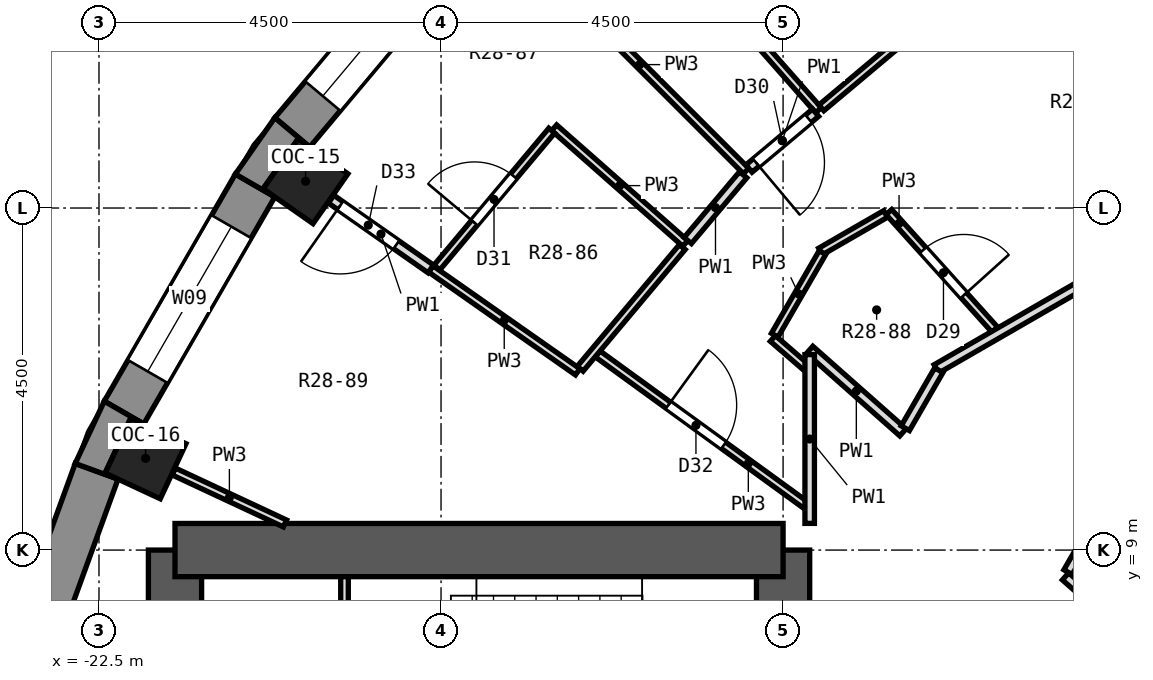
"""IFC4 building model, lengths in metres.
Left out: names, types, materials, properties, quantities, classifications, styles, units other than length and angle.
Written with IfcOpenShell. Run it as: python <this file> out.ifc"""

import sys

from ifc_helpers import new_model, si_unit, direction, frame, frame_2d, origin, origin_2d, place, context, subcontext, project, spatial, polyline, rectangle, outline, extrude, element, fill, save


model = new_model("IFC4")
c1 = context("Model", 3, precision=1e-05, world=origin(), true_north=direction((0.0, 1.0)))
c2 = subcontext(c1, "Body", "Model", "MODEL_VIEW")
j1 = project(units=[si_unit("LENGTHUNIT", "METRE"), si_unit("PLANEANGLEUNIT", "RADIAN")], contexts=[c1])
p1 = place(None, origin())
s1 = spatial("IfcSite", under=j1, at=p1, CompositionType="ELEMENT")
p2 = place(p1, origin())
s2 = spatial("IfcBuilding", under=s1, at=p2, CompositionType="ELEMENT")
p3 = place(p2, frame((0.0, 0.0, 190.5)))
s3 = spatial("IfcBuildingStorey", under=s2, at=p3, CompositionType="ELEMENT", Elevation=190.5)
for number, where, z_axis, x_axis in (
    (1, (-19.782, 13.852, 0.0), (0.0, 0.0, 1.0), (-0.819, 0.574, 0.0)),
    (2, (-21.887, 10.206, 0.0), (0.0, 0.0, 1.0), (-0.906, 0.423, 0.0)),
):
    element("IfcColumn", number, at=place(p3, frame(where, z_axis=z_axis, x_axis=x_axis)), inside=s3, PredefinedType="COLUMN", context=c2, shape_type="SweptSolid", body=[
        extrude(rectangle(XDim=0.8, YDim=0.8, at=origin_2d()), origin(), (0.0, 0.0, 1.0), 3.3),
    ])
p4 = place(p3, frame((-13.5, -9.0, 0.0), z_axis=(0.0, 0.0, 1.0), x_axis=(0.0, 1.0, 0.0)))
e3 = element("IfcWall", 3, at=p4, inside=s3, PredefinedType="SHEAR", context=c2, shape_type="SweptSolid", body=[
    extrude(rectangle(XDim=18.0, YDim=0.7, at=frame_2d((9.0, 0.0))), origin(), (0.0, 0.0, 1.0), 3.3),
])
p5 = place(p4, frame((15.4, 0.0, 0.0)))
e4 = element("IfcOpeningElement", 4, at=p5, cuts=e3, PredefinedType="OPENING", context=c2, shape_type="SweptSolid", body=[
    extrude(rectangle(XDim=1.2, YDim=2.1, at=frame_2d((0.6, 1.05))), frame((0.0, 0.362, 0.0), z_axis=(0.0, -1.0, 0.0), x_axis=(1.0, 0.0, 0.0)), (0.0, 0.0, 1.0), 0.724),
])
p6 = place(p4, frame((1.4, 0.0, 0.0)))
e5 = element("IfcOpeningElement", 5, at=p6, cuts=e3, PredefinedType="OPENING", context=c2, shape_type="SweptSolid", body=[
    extrude(rectangle(XDim=1.2, YDim=2.1, at=frame_2d((0.6, 1.05))), frame((0.0, 0.362, 0.0), z_axis=(0.0, -1.0, 0.0), x_axis=(1.0, 0.0, 0.0)), (0.0, 0.0, 1.0), 0.724),
])
p7 = place(p4, frame((7.5, 0.0, 0.0)))
e6 = element("IfcOpeningElement", 6, at=p7, cuts=e3, PredefinedType="OPENING", context=c2, shape_type="SweptSolid", body=[
    extrude(rectangle(XDim=3.0, YDim=2.4, at=frame_2d((1.5, 1.2))), frame((0.0, 0.362, 0.0), z_axis=(0.0, -1.0, 0.0), x_axis=(1.0, 0.0, 0.0)), (0.0, 0.0, 1.0), 0.724),
])
p8 = place(p3, frame((-21.5, -9.0, 0.0), z_axis=(0.0, 0.0, 1.0), x_axis=(0.0, 1.0, 0.0)))
e7 = element("IfcWall", 7, at=p8, inside=s3, PredefinedType="SHEAR", context=c2, shape_type="SweptSolid", body=[
    extrude(rectangle(XDim=18.0, YDim=0.7, at=frame_2d((9.0, 0.0))), origin(), (0.0, 0.0, 1.0), 3.3),
])
p9 = place(p8, frame((9.45, 0.0, 0.0)))
e8 = element("IfcOpeningElement", 8, at=p9, cuts=e7, PredefinedType="OPENING", context=c2, shape_type="SweptSolid", body=[
    extrude(rectangle(XDim=0.9, YDim=2.1, at=frame_2d((0.45, 1.05))), frame((0.0, 0.362, 0.0), z_axis=(0.0, -1.0, 0.0), x_axis=(1.0, 0.0, 0.0)), (0.0, 0.0, 1.0), 0.724),
])
p10 = place(p8, frame((7.65, 0.0, 0.0)))
e9 = element("IfcOpeningElement", 9, at=p10, cuts=e7, PredefinedType="OPENING", context=c2, shape_type="SweptSolid", body=[
    extrude(rectangle(XDim=0.9, YDim=2.1, at=frame_2d((0.45, 1.05))), frame((0.0, 0.362, 0.0), z_axis=(0.0, -1.0, 0.0), x_axis=(1.0, 0.0, 0.0)), (0.0, 0.0, 1.0), 0.724),
])
p11 = place(p3, frame((-13.5, 9.0, 0.0), z_axis=(0.0, 0.0, 1.0), x_axis=(-1.0, 0.0, 0.0)))
e10 = element("IfcWall", 10, at=p11, inside=s3, PredefinedType="SHEAR", context=c2, shape_type="SweptSolid", body=[
    extrude(rectangle(XDim=8.0, YDim=0.7, at=frame_2d((4.0, 0.0))), origin(), (0.0, 0.0, 1.0), 3.3),
])
p12 = place(p3, frame((-17.74, 17.137, 0.0), z_axis=(0.0, 0.0, 1.0), x_axis=(-0.642770398358, -0.766058884809, 0.0)))
e11 = element("IfcWall", 11, at=p12, inside=s3, PredefinedType="SOLIDWALL", context=c2, shape_type="SweptSolid", body=[
    extrude(rectangle(XDim=3.449, YDim=0.6, at=frame_2d((1.725, 0.0))), origin(), (0.0, 0.0, 1.0), 2.85),
])
p13 = place(p12, frame((0.625, 0.0, 0.9)))
e12 = element("IfcOpeningElement", 12, at=p13, cuts=e11, PredefinedType="OPENING", context=c2, shape_type="SweptSolid", body=[
    extrude(rectangle(XDim=2.2, YDim=1.8, at=frame_2d((1.1, 0.9))), frame((0.0, 0.312, 0.0), z_axis=(0.0, -1.0, 0.0), x_axis=(1.0, 0.0, 0.0)), (0.0, 0.0, 1.0), 0.624),
])
p14 = place(p3, frame((-20.446, 13.796, 0.0), z_axis=(0.0, 0.0, 1.0), x_axis=(-0.499998129301, -0.86602648383, 0.0)))
e13 = element("IfcWall", 13, at=p14, inside=s3, PredefinedType="SOLIDWALL", context=c2, shape_type="SweptSolid", body=[
    extrude(rectangle(XDim=3.45, YDim=0.6, at=frame_2d((1.725, 0.0))), origin(), (0.0, 0.0, 1.0), 2.85),
])
p15 = place(p14, frame((0.625, 0.0, 0.9)))
e14 = element("IfcOpeningElement", 14, at=p15, cuts=e13, PredefinedType="OPENING", context=c2, shape_type="SweptSolid", body=[
    extrude(rectangle(XDim=2.2, YDim=1.8, at=frame_2d((1.1, 0.9))), frame((0.0, 0.312, 0.0), z_axis=(0.0, -1.0, 0.0), x_axis=(1.0, 0.0, 0.0)), (0.0, 0.0, 1.0), 0.624),
])
p16 = place(p3, frame((-22.531, 10.036, 0.0), z_axis=(0.0, 0.0, 1.0), x_axis=(-0.342032843455, -0.93968799822, 0.0)))
e15 = element("IfcWall", 15, at=p16, inside=s3, PredefinedType="SOLIDWALL", context=c2, shape_type="SweptSolid", body=[
    extrude(rectangle(XDim=3.45, YDim=0.6, at=frame_2d((1.725, 0.0))), origin(), (0.0, 0.0, 1.0), 2.85),
])
p17 = place(p3, origin())
e16 = element("IfcWall", 16, at=p17, inside=s3, PredefinedType="SOLIDWALL", context=c2, shape_type="SweptSolid", body=[
    extrude(outline(polyline([(-20.187, 14.687), (-20.706, 13.946), (-20.186, 13.646), (-20.34, 13.754), (-19.881, 14.409), (-19.727, 14.302), (-20.187, 14.687)])), origin(), (0.0, 0.0, 1.0), 2.85),
])
p18 = place(p3, origin())
e17 = element("IfcWall", 17, at=p18, inside=s3, PredefinedType="SOLIDWALL", context=c2, shape_type="SweptSolid", body=[
    extrude(outline(polyline([(-22.813, 10.139), (-22.249, 9.934), (-22.419, 10.013), (-22.081, 10.738), (-21.911, 10.659), (-22.431, 10.959), (-22.813, 10.139)])), origin(), (0.0, 0.0, 1.0), 2.85),
])
p19 = place(p3, frame((-14.556, 16.512, 0.0), z_axis=(0.0, 0.0, 1.0), x_axis=(0.661368963491, -0.750060726962, 0.0)))
e18 = element("IfcWall", 18, at=p19, inside=s3, PredefinedType="PARTITIONING", context=c2, shape_type="SweptSolid", body=[
    extrude(rectangle(XDim=2.301, YDim=0.1, at=frame_2d((1.151, 0.0))), origin(), (0.0, 0.0, 1.0), 2.85),
])
p20 = place(p3, frame((-12.108, 13.447, 0.0), z_axis=(0.0, 0.0, 1.0), x_axis=(0.669048883613, -0.743218400833, 0.0)))
e19 = element("IfcWall", 19, at=p20, inside=s3, PredefinedType="PARTITIONING", context=c2, shape_type="SweptSolid", body=[
    extrude(rectangle(XDim=2.084, YDim=0.1, at=frame_2d((1.042, 0.0))), origin(), (0.0, 0.0, 1.0), 2.85),
])
p21 = place(p20, frame((0.673, 0.0, 0.0)))
e20 = element("IfcOpeningElement", 20, at=p21, cuts=e19, PredefinedType="OPENING", context=c2, shape_type="SweptSolid", body=[
    extrude(rectangle(XDim=0.8, YDim=2.1, at=frame_2d((0.4, 1.05))), frame((0.0, 0.062, 0.0), z_axis=(0.0, -1.0, 0.0), x_axis=(1.0, 0.0, 0.0)), (0.0, 0.0, 1.0), 0.124),
])
p22 = place(p3, frame((-16.787, 16.787, 0.0), z_axis=(0.0, 0.0, 1.0), x_axis=(0.707106781187, -0.707106781187, 0.0)))
e21 = element("IfcWall", 21, at=p22, inside=s3, PredefinedType="PARTITIONING", context=c2, shape_type="SweptSolid", body=[
    extrude(rectangle(XDim=3.959, YDim=0.1, at=frame_2d((1.979, 0.0))), origin(), (0.0, 0.0, 1.0), 2.85),
])
p23 = place(p3, frame((-13.15, 11.634, 0.0), z_axis=(0.0, 0.0, 1.0), x_axis=(0.748945343294, -0.662631777655, 0.0)))
e22 = element("IfcWall", 22, at=p23, inside=s3, PredefinedType="PARTITIONING", context=c2, shape_type="SweptSolid", body=[
    extrude(rectangle(XDim=1.638, YDim=0.125, at=frame_2d((0.819, 0.0))), origin(), (0.0, 0.0, 1.0), 2.85),
])
p24 = place(p3, frame((-9.784, 8.654, 0.0), z_axis=(0.0, 0.0, 1.0), x_axis=(0.74898514635, -0.662586787181, 0.0)))
e23 = element("IfcWall", 23, at=p24, inside=s3, PredefinedType="PARTITIONING", context=c2, shape_type="SweptSolid", body=[
    extrude(rectangle(XDim=4.49, YDim=0.125, at=frame_2d((2.245, 0.0))), origin(), (0.0, 0.0, 1.0), 2.85),
])
p25 = place(p3, frame((-16.512, 14.556, 0.0), z_axis=(0.0, 0.0, 1.0), x_axis=(0.750060726962, -0.661368963491, 0.0)))
e24 = element("IfcWall", 24, at=p25, inside=s3, PredefinedType="PARTITIONING", context=c2, shape_type="SweptSolid", body=[
    extrude(rectangle(XDim=2.301, YDim=0.1, at=frame_2d((1.151, 0.0))), origin(), (0.0, 0.0, 1.0), 2.85),
])
p26 = place(p3, frame((-13.635, 11.784, 0.0), z_axis=(0.0, 0.0, 1.0), x_axis=(0.75671861177, -0.653740730413, 0.0)))
e25 = element("IfcWall", 25, at=p26, inside=s3, PredefinedType="PARTITIONING", context=c2, shape_type="SweptSolid", body=[
    extrude(rectangle(XDim=0.578, YDim=0.1, at=frame_2d((0.289, 0.0))), origin(), (0.0, 0.0, 1.0), 2.85),
])
p27 = place(p3, frame((-15.939, 11.581, 0.0), z_axis=(0.0, 0.0, 1.0), x_axis=(0.809057281934, -0.587729797228, 0.0)))
e26 = element("IfcWall", 26, at=p27, inside=s3, PredefinedType="PARTITIONING", context=c2, shape_type="SweptSolid", body=[
    extrude(rectangle(XDim=3.384, YDim=0.1, at=frame_2d((1.692, 0.0))), origin(), (0.0, 0.0, 1.0), 2.85),
])
p28 = place(p27, frame((1.148, 0.0, 0.0)))
e27 = element("IfcOpeningElement", 27, at=p28, cuts=e26, PredefinedType="OPENING", context=c2, shape_type="SweptSolid", body=[
    extrude(rectangle(XDim=0.9, YDim=2.1, at=frame_2d((0.45, 1.05))), frame((0.0, 0.062, 0.0), z_axis=(0.0, -1.0, 0.0), x_axis=(1.0, 0.0, 0.0)), (0.0, 0.0, 1.0), 0.124),
])
p29 = place(p3, frame((-18.135, 12.699, 0.0), z_axis=(0.0, 0.0, 1.0), x_axis=(0.818979032307, -0.573823443789, 0.0)))
e28 = element("IfcWall", 28, at=p29, inside=s3, PredefinedType="PARTITIONING", context=c2, shape_type="SweptSolid", body=[
    extrude(rectangle(XDim=2.359, YDim=0.1, at=frame_2d((1.18, 0.0))), origin(), (0.0, 0.0, 1.0), 2.85),
])
p30 = place(p3, frame((-19.447, 13.617, 0.0), z_axis=(0.0, 0.0, 1.0), x_axis=(0.819188933795, -0.57352374907, 0.0)))
e29 = element("IfcWall", 29, at=p30, inside=s3, PredefinedType="PARTITIONING", context=c2, shape_type="SweptSolid", body=[
    extrude(rectangle(XDim=1.601, YDim=0.125, at=frame_2d((0.801, 0.0))), origin(), (0.0, 0.0, 1.0), 2.85),
])
p31 = place(p30, frame((0.147, 0.0, 0.0)))
e30 = element("IfcOpeningElement", 30, at=p31, cuts=e29, PredefinedType="OPENING", context=c2, shape_type="SweptSolid", body=[
    extrude(rectangle(XDim=0.9, YDim=2.1, at=frame_2d((0.45, 1.05))), frame((0.0, 0.074, 0.0), z_axis=(0.0, -1.0, 0.0), x_axis=(1.0, 0.0, 0.0)), (0.0, 0.0, 1.0), 0.149),
])
p32 = place(p3, frame((-21.516, 10.033, 0.0), z_axis=(0.0, 0.0, 1.0), x_axis=(0.906055596822, -0.423158664648, 0.0)))
e31 = element("IfcWall", 31, at=p32, inside=s3, PredefinedType="PARTITIONING", context=c2, shape_type="SweptSolid", body=[
    extrude(rectangle(XDim=1.614, YDim=0.1, at=frame_2d((0.807, 0.0))), origin(), (0.0, 0.0, 1.0), 2.85),
])
p33 = place(p3, frame((-11.482, 11.384, 0.0), z_axis=(0.0, 0.0, 1.0), x_axis=(0.866032345022, 0.499987977232, 0.0)))
e32 = element("IfcWall", 32, at=p33, inside=s3, PredefinedType="PARTITIONING", context=c2, shape_type="SweptSolid", body=[
    extrude(rectangle(XDim=8.357, YDim=0.125, at=frame_2d((4.179, 0.0))), origin(), (0.0, 0.0, 1.0), 2.85),
])
p34 = place(p33, frame((4.184, 0.0, 0.0)))
e33 = element("IfcOpeningElement", 33, at=p34, cuts=e32, PredefinedType="OPENING", context=c2, shape_type="SweptSolid", body=[
    extrude(rectangle(XDim=1.0, YDim=2.1, at=frame_2d((0.5, 1.05))), frame((0.0, 0.074, 0.0), z_axis=(0.0, -1.0, 0.0), x_axis=(1.0, 0.0, 0.0)), (0.0, 0.0, 1.0), 0.149),
])
p35 = place(p3, frame((-13.007, 12.928, 0.0), z_axis=(0.0, 0.0, 1.0), x_axis=(0.86609095339, 0.499886447563, 0.0)))
e34 = element("IfcWall", 34, at=p35, inside=s3, PredefinedType="PARTITIONING", context=c2, shape_type="SweptSolid", body=[
    extrude(rectangle(XDim=0.988, YDim=0.1, at=frame_2d((0.494, 0.0))), origin(), (0.0, 0.0, 1.0), 2.85),
])
p36 = place(p3, frame((-12.996, 14.818, 0.0), z_axis=(0.0, 0.0, 1.0), x_axis=(0.766068087891, 0.642759429892, 0.0)))
e35 = element("IfcWall", 35, at=p36, inside=s3, PredefinedType="PARTITIONING", context=c2, shape_type="SweptSolid", body=[
    extrude(rectangle(XDim=2.105, YDim=0.1, at=frame_2d((1.052, 0.0))), origin(), (0.0, 0.0, 1.0), 2.85),
])
p37 = place(p3, frame((-13.949, 14.019, 0.0), z_axis=(0.0, 0.0, 1.0), x_axis=(0.766293239505, 0.642490989111, 0.0)))
e36 = element("IfcWall", 36, at=p37, inside=s3, PredefinedType="PARTITIONING", context=c2, shape_type="SweptSolid", body=[
    extrude(rectangle(XDim=1.144, YDim=0.125, at=frame_2d((0.572, 0.0))), origin(), (0.0, 0.0, 1.0), 2.85),
])
p38 = place(p37, frame((0.122, 0.0, 0.0)))
e37 = element("IfcOpeningElement", 37, at=p38, cuts=e36, PredefinedType="OPENING", context=c2, shape_type="SweptSolid", body=[
    extrude(rectangle(XDim=0.9, YDim=2.1, at=frame_2d((0.45, 1.05))), frame((0.0, 0.074, 0.0), z_axis=(0.0, -1.0, 0.0), x_axis=(1.0, 0.0, 0.0)), (0.0, 0.0, 1.0), 0.149),
])
p39 = place(p3, frame((-14.754, 13.072, 0.0), z_axis=(0.0, 0.0, 1.0), x_axis=(0.644208847233, 0.76484963303, 0.0)))
e38 = element("IfcWall", 38, at=p39, inside=s3, PredefinedType="PARTITIONING", context=c2, shape_type="SweptSolid", body=[
    extrude(rectangle(XDim=1.131, YDim=0.125, at=frame_2d((0.566, 0.0))), origin(), (0.0, 0.0, 1.0), 2.85),
])
p40 = place(p3, frame((-16.169, 11.385, 0.0), z_axis=(0.0, 0.0, 1.0), x_axis=(0.642720670629, 0.766100606674, 0.0)))
e39 = element("IfcWall", 39, at=p40, inside=s3, PredefinedType="PARTITIONING", context=c2, shape_type="SweptSolid", body=[
    extrude(rectangle(XDim=2.09, YDim=0.1, at=frame_2d((1.045, 0.0))), origin(), (0.0, 0.0, 1.0), 2.85),
])
p41 = place(p3, frame((-18.054, 12.718, 0.0), z_axis=(0.0, 0.0, 1.0), x_axis=(0.642675237257, 0.76613872074, 0.0)))
e40 = element("IfcWall", 40, at=p41, inside=s3, PredefinedType="PARTITIONING", context=c2, shape_type="SweptSolid", body=[
    extrude(rectangle(XDim=2.349, YDim=0.1, at=frame_2d((1.175, 0.0))), origin(), (0.0, 0.0, 1.0), 2.85),
])
p42 = place(p41, frame((0.768, 0.0, 0.0)))
e41 = element("IfcOpeningElement", 41, at=p42, cuts=e40, PredefinedType="OPENING", context=c2, shape_type="SweptSolid", body=[
    extrude(rectangle(XDim=0.8, YDim=2.1, at=frame_2d((0.4, 1.05))), frame((0.0, 0.062, 0.0), z_axis=(0.0, -1.0, 0.0), x_axis=(1.0, 0.0, 0.0)), (0.0, 0.0, 1.0), 0.124),
])
p43 = place(p3, frame((-9.752, 8.709, 0.0), z_axis=(0.0, 0.0, 1.0), x_axis=(0.500074377092, 0.865982457891, 0.0)))
e42 = element("IfcWall", 42, at=p43, inside=s3, PredefinedType="PARTITIONING", context=c2, shape_type="SweptSolid", body=[
    extrude(rectangle(XDim=0.701, YDim=0.125, at=frame_2d((0.35, 0.0))), origin(), (0.0, 0.0, 1.0), 2.85),
])
p44 = place(p3, frame((-11.892, 10.603, 0.0), z_axis=(0.0, 0.0, 1.0), x_axis=(0.50016217861, 0.865931749671, 0.0)))
e43 = element("IfcWall", 43, at=p44, inside=s3, PredefinedType="PARTITIONING", context=c2, shape_type="SweptSolid", body=[
    extrude(rectangle(XDim=0.881, YDim=0.125, at=frame_2d((0.44, 0.0))), origin(), (0.0, 0.0, 1.0), 2.85),
])
p45 = place(p3, frame((-13.61, 11.827, 0.0), z_axis=(0.0, 0.0, 1.0), x_axis=(0.500407250634, 0.865790149813, 0.0)))
e44 = element("IfcWall", 44, at=p45, inside=s3, PredefinedType="PARTITIONING", context=c2, shape_type="SweptSolid", body=[
    extrude(rectangle(XDim=1.255, YDim=0.1, at=frame_2d((0.627, 0.0))), origin(), (0.0, 0.0, 1.0), 2.85),
])
p46 = place(p3, frame((-13.15, 9.351, 0.0), z_axis=(0.0, 0.0, 1.0), x_axis=(0.0, 1.0, 0.0)))
e45 = element("IfcWall", 45, at=p46, inside=s3, PredefinedType="PARTITIONING", context=c2, shape_type="SweptSolid", body=[
    extrude(rectangle(XDim=2.22, YDim=0.125, at=frame_2d((1.11, 0.0))), origin(), (0.0, 0.0, 1.0), 2.85),
])
p47 = place(p3, frame((-19.27, 5.2, 0.0), z_axis=(0.0, 0.0, 1.0), x_axis=(0.0, 1.0, 0.0)))
e46 = element("IfcWall", 46, at=p47, inside=s3, PredefinedType="PARTITIONING", context=c2, shape_type="SweptSolid", body=[
    extrude(rectangle(XDim=3.45, YDim=0.1, at=frame_2d((1.725, 0.0))), origin(), (0.0, 0.0, 1.0), 2.85),
])
p48 = place(p13, origin())
e47 = element("IfcWindow", 47, at=p48, inside=s3, PartitioningType="SINGLE_PANEL", PredefinedType="WINDOW", context=c2, shape_type="SweptSolid", body=[
    extrude(rectangle(XDim=2.2, YDim=1.8, at=frame_2d((1.1, 0.9))), frame((0.0, 0.18, 0.0), z_axis=(0.0, -1.0, 0.0), x_axis=(1.0, 0.0, 0.0)), (0.0, 0.0, 1.0), 0.06),
])
fill(e12, e47)
p49 = place(p15, origin())
e48 = element("IfcWindow", 48, at=p49, inside=s3, PartitioningType="SINGLE_PANEL", PredefinedType="WINDOW", context=c2, shape_type="SweptSolid", body=[
    extrude(rectangle(XDim=2.2, YDim=1.8, at=frame_2d((1.1, 0.9))), frame((0.0, 0.18, 0.0), z_axis=(0.0, -1.0, 0.0), x_axis=(1.0, 0.0, 0.0)), (0.0, 0.0, 1.0), 0.06),
])
fill(e14, e48)
p50 = place(p21, origin())
e49 = element("IfcDoor", 49, at=p50, inside=s3, OperationType="SINGLE_SWING_RIGHT", PredefinedType="DOOR", context=c2, shape_type="SweptSolid", body=[
    extrude(rectangle(XDim=0.8, YDim=2.1, at=frame_2d((0.4, 1.05))), frame((0.0, 0.025, 0.0), z_axis=(0.0, -1.0, 0.0), x_axis=(1.0, 0.0, 0.0)), (0.0, 0.0, 1.0), 0.05),
])
fill(e20, e49)
p51 = place(p38, frame((0.9, 0.0, 0.0), z_axis=(0.0, 0.0, 1.0), x_axis=(-1.0, 0.0, 0.0)))
e50 = element("IfcDoor", 50, at=p51, inside=s3, OperationType="SINGLE_SWING_RIGHT", PredefinedType="DOOR", context=c2, shape_type="SweptSolid", body=[
    extrude(rectangle(XDim=0.9, YDim=2.1, at=frame_2d((0.45, 1.05))), frame((0.0, 0.025, 0.0), z_axis=(0.0, -1.0, 0.0), x_axis=(1.0, 0.0, 0.0)), (0.0, 0.0, 1.0), 0.05),
])
fill(e37, e50)
p52 = place(p42, origin())
e51 = element("IfcDoor", 51, at=p52, inside=s3, OperationType="SINGLE_SWING_LEFT", PredefinedType="DOOR", context=c2, shape_type="SweptSolid", body=[
    extrude(rectangle(XDim=0.8, YDim=2.1, at=frame_2d((0.4, 1.05))), frame((0.0, 0.025, 0.0), z_axis=(0.0, -1.0, 0.0), x_axis=(1.0, 0.0, 0.0)), (0.0, 0.0, 1.0), 0.05),
])
fill(e41, e51)
p53 = place(p28, origin())
e52 = element("IfcDoor", 52, at=p53, inside=s3, OperationType="SINGLE_SWING_LEFT", PredefinedType="DOOR", context=c2, shape_type="SweptSolid", body=[
    extrude(rectangle(XDim=0.9, YDim=2.1, at=frame_2d((0.45, 1.05))), frame((0.0, 0.025, 0.0), z_axis=(0.0, -1.0, 0.0), x_axis=(1.0, 0.0, 0.0)), (0.0, 0.0, 1.0), 0.05),
])
fill(e27, e52)
p54 = place(p31, frame((0.9, 0.0, 0.0), z_axis=(0.0, 0.0, 1.0), x_axis=(-1.0, 0.0, 0.0)))
e53 = element("IfcDoor", 53, at=p54, inside=s3, OperationType="SINGLE_SWING_RIGHT", PredefinedType="DOOR", context=c2, shape_type="SweptSolid", body=[
    extrude(rectangle(XDim=0.9, YDim=2.1, at=frame_2d((0.45, 1.05))), frame((0.0, 0.025, 0.0), z_axis=(0.0, -1.0, 0.0), x_axis=(1.0, 0.0, 0.0)), (0.0, 0.0, 1.0), 0.05),
])
fill(e30, e53)
save(model, sys.argv[1])
